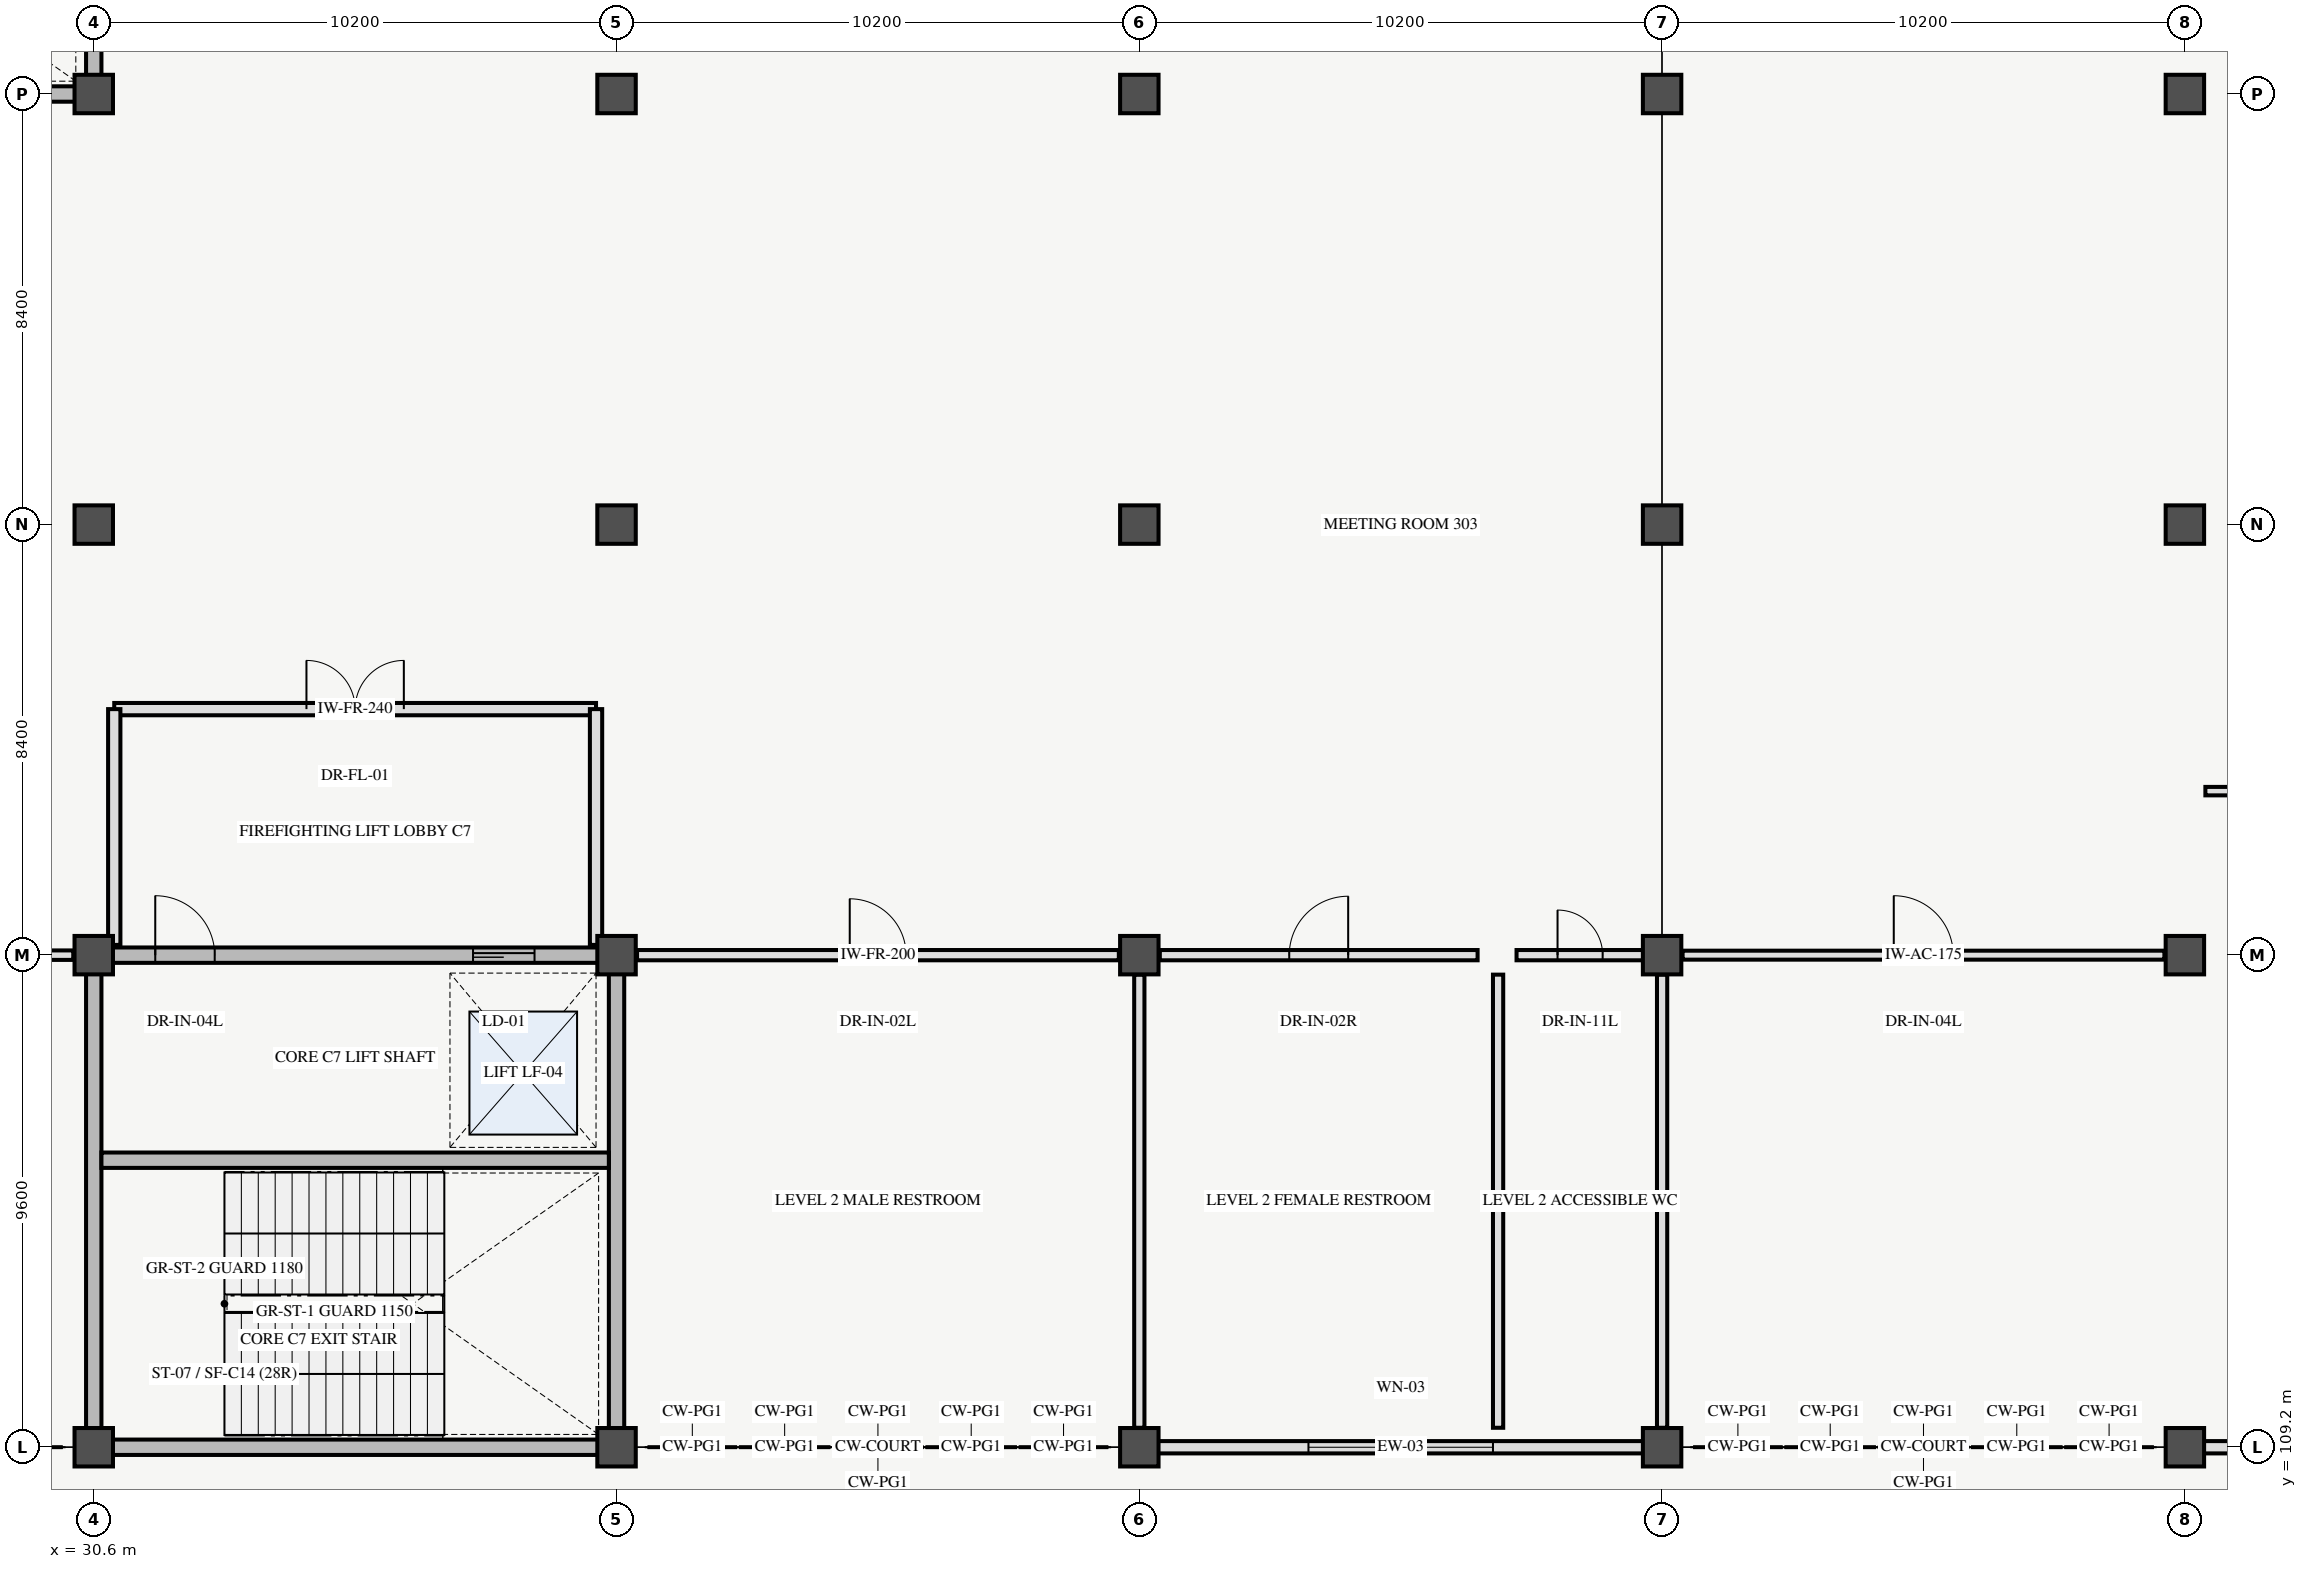
"""IFC4 building model, lengths in metres.
Left out: names, types, materials, properties, quantities, classifications, styles, units other than length and angle.
Written with IfcOpenShell. Run it as: python <this file> out.ifc"""

import sys

from ifc_helpers import new_model, si_unit, direction, frame, frame_2d, origin, origin_2d, place, context, subcontext, project, spatial, rectangle, extrude, element, fill, save


model = new_model("IFC4")
c1 = context("Model", 3, precision=1e-05, world=origin(), true_north=direction((0.0, 1.0)))
c2 = subcontext(c1, "Body", "Model", "MODEL_VIEW")
j1 = project(units=[si_unit("LENGTHUNIT", "METRE"), si_unit("PLANEANGLEUNIT", "RADIAN")], contexts=[c1])
p1 = place(None, origin())
s1 = spatial("IfcSite", under=j1, at=p1, CompositionType="ELEMENT")
p2 = place(p1, origin())
s2 = spatial("IfcBuilding", under=s1, at=p2, CompositionType="ELEMENT")
p3 = place(p2, frame((0.0, 0.0, 10.8)))
s3 = spatial("IfcBuildingStorey", under=s2, at=p3, CompositionType="ELEMENT", Elevation=10.8)
for number, where, z_axis, x_axis in (
    (1, (30.6, 109.2, 0.0), (0.0, 0.0, 1.0), (1.0, 0.0, 0.0)),
    (2, (30.6, 118.8, 0.0), (0.0, 0.0, 1.0), (1.0, 0.0, 0.0)),
    (3, (30.6, 127.2, 0.0), (0.0, 0.0, 1.0), (1.0, 0.0, 0.0)),
    (4, (30.6, 135.6, 0.0), (0.0, 0.0, 1.0), (1.0, 0.0, 0.0)),
    (5, (40.8, 109.2, 0.0), (0.0, 0.0, 1.0), (1.0, 0.0, 0.0)),
    (6, (40.8, 118.8, 0.0), (0.0, 0.0, 1.0), (1.0, 0.0, 0.0)),
    (7, (40.8, 127.2, 0.0), (0.0, 0.0, 1.0), (1.0, 0.0, 0.0)),
    (8, (40.8, 135.6, 0.0), (0.0, 0.0, 1.0), (1.0, 0.0, 0.0)),
    (9, (51.0, 109.2, 0.0), (0.0, 0.0, 1.0), (1.0, 0.0, 0.0)),
    (10, (51.0, 118.8, 0.0), (0.0, 0.0, 1.0), (1.0, 0.0, 0.0)),
    (11, (51.0, 127.2, 0.0), (0.0, 0.0, 1.0), (1.0, 0.0, 0.0)),
    (12, (51.0, 135.6, 0.0), (0.0, 0.0, 1.0), (1.0, 0.0, 0.0)),
    (13, (61.2, 109.2, 0.0), (0.0, 0.0, 1.0), (1.0, 0.0, 0.0)),
    (14, (61.2, 118.8, 0.0), (0.0, 0.0, 1.0), (1.0, 0.0, 0.0)),
    (15, (61.2, 127.2, 0.0), (0.0, 0.0, 1.0), (1.0, 0.0, 0.0)),
    (16, (61.2, 135.6, 0.0), (0.0, 0.0, 1.0), (1.0, 0.0, 0.0)),
    (17, (71.4, 109.2, 0.0), (0.0, 0.0, 1.0), (1.0, 0.0, 0.0)),
    (18, (71.4, 118.8, 0.0), (0.0, 0.0, 1.0), (1.0, 0.0, 0.0)),
    (19, (71.4, 127.2, 0.0), (0.0, 0.0, 1.0), (1.0, 0.0, 0.0)),
    (20, (71.4, 135.6, 0.0), (0.0, 0.0, 1.0), (1.0, 0.0, 0.0)),
):
    element("IfcColumn", number, at=place(p3, frame(where, z_axis=z_axis, x_axis=x_axis)), inside=s3, PredefinedType="COLUMN", context=c2, shape_type="SweptSolid", body=[
        extrude(rectangle(XDim=0.75, YDim=0.75, at=origin_2d()), origin(), (0.0, 0.0, 1.0), 4.2),
    ])
p4 = place(p3, frame((30.6, 109.2, 0.0), z_axis=(0.0, 0.0, 1.0), x_axis=(1.0, 0.0, 0.0)))
e21 = element("IfcWall", 21, at=p4, inside=s3, PredefinedType="SHEAR", context=c2, shape_type="SweptSolid", body=[
    extrude(rectangle(XDim=10.2, YDim=0.3, at=frame_2d((5.1, 0.0))), origin(), (0.0, 0.0, 1.0), 4.2),
])
p5 = place(p3, frame((30.6, 118.8, 0.0), z_axis=(0.0, 0.0, 1.0), x_axis=(1.0, 0.0, 0.0)))
e22 = element("IfcWall", 22, at=p5, inside=s3, PredefinedType="SHEAR", context=c2, shape_type="SweptSolid", body=[
    extrude(rectangle(XDim=10.2, YDim=0.3, at=frame_2d((5.1, 0.0))), origin(), (0.0, 0.0, 1.0), 4.2),
])
p6 = place(p5, frame((1.2, 0.0, 0.0)))
e23 = element("IfcOpeningElement", 23, at=p6, cuts=e22, PredefinedType="OPENING", context=c2, shape_type="SweptSolid", body=[
    extrude(rectangle(XDim=1.16, YDim=2.2, at=frame_2d((0.58, 1.1))), frame((0.0, 0.16, 0.0), z_axis=(0.0, -1.0, 0.0), x_axis=(1.0, 0.0, 0.0)), (0.0, 0.0, 1.0), 0.32),
])
p7 = place(p5, frame((7.4, 0.0, 0.0)))
e24 = element("IfcOpeningElement", 24, at=p7, cuts=e22, PredefinedType="OPENING", context=c2, shape_type="SweptSolid", body=[
    extrude(rectangle(XDim=1.2, YDim=2.25, at=frame_2d((0.6, 1.125))), frame((0.0, 0.16, 0.0), z_axis=(0.0, -1.0, 0.0), x_axis=(1.0, 0.0, 0.0)), (0.0, 0.0, 1.0), 0.32),
])
for number, where, z_axis, x_axis in (
    (25, (30.6, 109.2, 0.0), (0.0, 0.0, 1.0), (0.0, 1.0, 0.0)),
    (26, (40.8, 109.2, 0.0), (0.0, 0.0, 1.0), (0.0, 1.0, 0.0)),
):
    element("IfcWall", number, at=place(p3, frame(where, z_axis=z_axis, x_axis=x_axis)), inside=s3, PredefinedType="SHEAR", context=c2, shape_type="SweptSolid", body=[
        extrude(rectangle(XDim=9.6, YDim=0.3, at=frame_2d((4.8, 0.0))), origin(), (0.0, 0.0, 1.0), 4.2),
    ])
p8 = place(p3, frame((51.24, 109.2, 0.0), z_axis=(0.0, 0.0, 1.0), x_axis=(1.0, 0.0, 0.0)))
e27 = element("IfcWall", 27, at=p8, inside=s3, PredefinedType="STANDARD", context=c2, shape_type="SweptSolid", body=[
    extrude(rectangle(XDim=9.72, YDim=0.24, at=frame_2d((4.86, 0.0))), origin(), (0.0, 0.0, 1.0), 3.06),
])
p9 = place(p8, frame((3.06, 0.0, 0.9)))
e28 = element("IfcOpeningElement", 28, at=p9, cuts=e27, PredefinedType="OPENING", context=c2, shape_type="SweptSolid", body=[
    extrude(rectangle(XDim=3.6, YDim=2.1, at=frame_2d((1.8, 1.05))), frame((0.0, 0.13, 0.0), z_axis=(0.0, -1.0, 0.0), x_axis=(1.0, 0.0, 0.0)), (0.0, 0.0, 1.0), 0.26),
])
p10 = place(p3, frame((71.64, 109.2, 0.0), z_axis=(0.0, 0.0, 1.0), x_axis=(1.0, 0.0, 0.0)))
e29 = element("IfcWall", 29, at=p10, inside=s3, PredefinedType="STANDARD", context=c2, shape_type="SweptSolid", body=[
    extrude(rectangle(XDim=9.72, YDim=0.24, at=frame_2d((4.86, 0.0))), origin(), (0.0, 0.0, 1.0), 3.06),
])
p11 = place(p10, frame((3.06, 0.0, 0.9)))
e30 = element("IfcOpeningElement", 30, at=p11, cuts=e29, PredefinedType="OPENING", context=c2, shape_type="SweptSolid", body=[
    extrude(rectangle(XDim=3.6, YDim=2.1, at=frame_2d((1.8, 1.05))), frame((0.0, 0.13, 0.0), z_axis=(0.0, -1.0, 0.0), x_axis=(1.0, 0.0, 0.0)), (0.0, 0.0, 1.0), 0.26),
])
p12 = place(p3, frame((30.75, 114.8, 0.0), z_axis=(0.0, 0.0, 1.0), x_axis=(1.0, 0.0, 0.0)))
e31 = element("IfcWall", 31, at=p12, inside=s3, PredefinedType="SHEAR", context=c2, shape_type="SweptSolid", body=[
    extrude(rectangle(XDim=9.9, YDim=0.3, at=frame_2d((4.95, 0.0))), origin(), (0.0, 0.0, 1.0), 4.2),
])
p13 = place(p3, frame((20.4, 135.6, 0.0), z_axis=(0.0, 0.0, 1.0), x_axis=(1.0, 0.0, 0.0)))
e32 = element("IfcWall", 32, at=p13, inside=s3, PredefinedType="SHEAR", context=c2, shape_type="SweptSolid", body=[
    extrude(rectangle(XDim=10.2, YDim=0.3, at=frame_2d((5.1, 0.0))), origin(), (0.0, 0.0, 1.0), 4.2),
])
p14 = place(p13, frame((0.92, 0.0, 0.0)))
e33 = element("IfcOpeningElement", 33, at=p14, cuts=e32, PredefinedType="OPENING", context=c2, shape_type="SweptSolid", body=[
    extrude(rectangle(XDim=1.16, YDim=2.2, at=frame_2d((0.58, 1.1))), frame((0.0, 0.16, 0.0), z_axis=(0.0, -1.0, 0.0), x_axis=(1.0, 0.0, 0.0)), (0.0, 0.0, 1.0), 0.32),
])
p15 = place(p3, frame((30.6, 135.6, 0.0), z_axis=(0.0, 0.0, 1.0), x_axis=(0.0, 1.0, 0.0)))
e34 = element("IfcWall", 34, at=p15, inside=s3, PredefinedType="SHEAR", context=c2, shape_type="SweptSolid", body=[
    extrude(rectangle(XDim=8.4, YDim=0.3, at=frame_2d((4.2, 0.0))), origin(), (0.0, 0.0, 1.0), 4.2),
])
p16 = place(p3, frame((31.0, 123.6, 0.0), z_axis=(0.0, 0.0, 1.0), x_axis=(1.0, 0.0, 0.0)))
e35 = element("IfcWall", 35, at=p16, inside=s3, PredefinedType="PARTITIONING", context=c2, shape_type="SweptSolid", body=[
    extrude(rectangle(XDim=9.4, YDim=0.24, at=frame_2d((4.7, 0.0))), origin(), (0.0, 0.0, 1.0), 3.06),
])
p17 = place(p16, frame((3.75, 0.0, 0.0)))
e36 = element("IfcOpeningElement", 36, at=p17, cuts=e35, PredefinedType="OPENING", context=c2, shape_type="SweptSolid", body=[
    extrude(rectangle(XDim=1.9, YDim=2.25, at=frame_2d((0.95, 1.125))), frame((0.0, 0.13, 0.0), z_axis=(0.0, -1.0, 0.0), x_axis=(1.0, 0.0, 0.0)), (0.0, 0.0, 1.0), 0.26),
])
for number, where, z_axis, x_axis in (
    (37, (40.4, 119.0, 0.0), (0.0, 0.0, 1.0), (0.0, 1.0, 0.0)),
    (38, (31.0, 119.0, 0.0), (0.0, 0.0, 1.0), (0.0, 1.0, 0.0)),
):
    element("IfcWall", number, at=place(p3, frame(where, z_axis=z_axis, x_axis=x_axis)), inside=s3, PredefinedType="PARTITIONING", context=c2, shape_type="SweptSolid", body=[
        extrude(rectangle(XDim=4.6, YDim=0.24, at=frame_2d((2.3, 0.0))), origin(), (0.0, 0.0, 1.0), 3.06),
    ])
p18 = place(p3, frame((41.2, 118.8, 0.0), z_axis=(0.0, 0.0, 1.0), x_axis=(1.0, 0.0, 0.0)))
e39 = element("IfcWall", 39, at=p18, inside=s3, PredefinedType="PARTITIONING", context=c2, shape_type="SweptSolid", body=[
    extrude(rectangle(XDim=9.4, YDim=0.2, at=frame_2d((4.7, 0.0))), origin(), (0.0, 0.0, 1.0), 3.06),
])
p19 = place(p18, frame((4.15, 0.0, 0.0)))
e40 = element("IfcOpeningElement", 40, at=p19, cuts=e39, PredefinedType="OPENING", context=c2, shape_type="SweptSolid", body=[
    extrude(rectangle(XDim=1.1, YDim=2.2, at=frame_2d((0.55, 1.1))), frame((0.0, 0.11, 0.0), z_axis=(0.0, -1.0, 0.0), x_axis=(1.0, 0.0, 0.0)), (0.0, 0.0, 1.0), 0.22),
])
p20 = place(p3, frame((51.4, 118.8, 0.0), z_axis=(0.0, 0.0, 1.0), x_axis=(1.0, 0.0, 0.0)))
e41 = element("IfcWall", 41, at=p20, inside=s3, PredefinedType="PARTITIONING", context=c2, shape_type="SweptSolid", body=[
    extrude(rectangle(XDim=6.2, YDim=0.2, at=frame_2d((3.1, 0.0))), origin(), (0.0, 0.0, 1.0), 3.06),
])
p21 = place(p20, frame((2.525, 0.0, 0.0)))
e42 = element("IfcOpeningElement", 42, at=p21, cuts=e41, PredefinedType="OPENING", context=c2, shape_type="SweptSolid", body=[
    extrude(rectangle(XDim=1.15, YDim=2.2, at=frame_2d((0.575, 1.1))), frame((0.0, 0.11, 0.0), z_axis=(0.0, -1.0, 0.0), x_axis=(1.0, 0.0, 0.0)), (0.0, 0.0, 1.0), 0.22),
])
p22 = place(p3, frame((20.8, 118.8, 0.0), z_axis=(0.0, 0.0, 1.0), x_axis=(1.0, 0.0, 0.0)))
e43 = element("IfcWall", 43, at=p22, inside=s3, PredefinedType="PARTITIONING", context=c2, shape_type="SweptSolid", body=[
    extrude(rectangle(XDim=9.4, YDim=0.185, at=frame_2d((4.7, 0.0))), origin(), (0.0, 0.0, 1.0), 3.06),
])
p23 = place(p22, frame((4.22, 0.0, 0.0)))
e44 = element("IfcOpeningElement", 44, at=p23, cuts=e43, PredefinedType="OPENING", context=c2, shape_type="SweptSolid", body=[
    extrude(rectangle(XDim=0.96, YDim=2.1, at=frame_2d((0.48, 1.05))), frame((0.0, 0.103, 0.0), z_axis=(0.0, -1.0, 0.0), x_axis=(1.0, 0.0, 0.0)), (0.0, 0.0, 1.0), 0.205),
])
p24 = place(p3, frame((61.6, 118.8, 0.0), z_axis=(0.0, 0.0, 1.0), x_axis=(1.0, 0.0, 0.0)))
e45 = element("IfcWall", 45, at=p24, inside=s3, PredefinedType="PARTITIONING", context=c2, shape_type="SweptSolid", body=[
    extrude(rectangle(XDim=9.4, YDim=0.175, at=frame_2d((4.7, 0.0))), origin(), (0.0, 0.0, 1.0), 3.06),
])
p25 = place(p24, frame((4.12, 0.0, 0.0)))
e46 = element("IfcOpeningElement", 46, at=p25, cuts=e45, PredefinedType="OPENING", context=c2, shape_type="SweptSolid", body=[
    extrude(rectangle(XDim=1.16, YDim=2.2, at=frame_2d((0.58, 1.1))), frame((0.0, 0.097, 0.0), z_axis=(0.0, -1.0, 0.0), x_axis=(1.0, 0.0, 0.0)), (0.0, 0.0, 1.0), 0.195),
])
p26 = place(p3, frame((71.8, 122.0, 0.0), z_axis=(0.0, 0.0, 1.0), x_axis=(1.0, 0.0, 0.0)))
e47 = element("IfcWall", 47, at=p26, inside=s3, PredefinedType="PARTITIONING", context=c2, shape_type="SweptSolid", body=[
    extrude(rectangle(XDim=9.4, YDim=0.165, at=frame_2d((4.7, 0.0))), origin(), (0.0, 0.0, 1.0), 3.06),
])
p27 = place(p26, frame((4.08, 0.0, 0.0)))
e48 = element("IfcOpeningElement", 48, at=p27, cuts=e47, PredefinedType="OPENING", context=c2, shape_type="SweptSolid", body=[
    extrude(rectangle(XDim=1.24, YDim=2.2, at=frame_2d((0.62, 1.1))), frame((0.0, 0.093, 0.0), z_axis=(0.0, -1.0, 0.0), x_axis=(1.0, 0.0, 0.0)), (0.0, 0.0, 1.0), 0.185),
])
p28 = place(p3, frame((58.36, 118.8, 0.0), z_axis=(0.0, 0.0, 1.0), x_axis=(1.0, 0.0, 0.0)))
e49 = element("IfcWall", 49, at=p28, inside=s3, PredefinedType="PARTITIONING", context=c2, shape_type="SweptSolid", body=[
    extrude(rectangle(XDim=2.48, YDim=0.2, at=frame_2d((1.24, 0.0))), origin(), (0.0, 0.0, 1.0), 3.06),
])
p29 = place(p28, frame((0.8, 0.0, 0.0)))
e50 = element("IfcOpeningElement", 50, at=p29, cuts=e49, PredefinedType="OPENING", context=c2, shape_type="SweptSolid", body=[
    extrude(rectangle(XDim=0.88, YDim=2.08, at=frame_2d((0.44, 1.04))), frame((0.0, 0.11, 0.0), z_axis=(0.0, -1.0, 0.0), x_axis=(1.0, 0.0, 0.0)), (0.0, 0.0, 1.0), 0.22),
])
for number, where, z_axis, x_axis in (
    (51, (51.0, 109.58, 0.0), (0.0, 0.0, 1.0), (0.0, 1.0, 0.0)),
    (52, (58.0, 109.58, 0.0), (0.0, 0.0, 1.0), (0.0, 1.0, 0.0)),
    (53, (61.2, 109.58, 0.0), (0.0, 0.0, 1.0), (0.0, 1.0, 0.0)),
):
    element("IfcWall", number, at=place(p3, frame(where, z_axis=z_axis, x_axis=x_axis)), inside=s3, PredefinedType="PARTITIONING", context=c2, shape_type="SweptSolid", body=[
        extrude(rectangle(XDim=8.84, YDim=0.2, at=frame_2d((4.42, 0.0))), origin(), (0.0, 0.0, 1.0), 3.06),
    ])
p30 = place(p9, origin())
e54 = element("IfcWindow", 54, at=p30, inside=s3, PartitioningType="TRIPLE_PANEL_VERTICAL", PredefinedType="WINDOW", context=c2, shape_type="SweptSolid", body=[
    extrude(rectangle(XDim=3.6, YDim=2.1, at=frame_2d((1.8, 1.05))), frame((0.0, 0.03, 0.0), z_axis=(0.0, -1.0, 0.0), x_axis=(1.0, 0.0, 0.0)), (0.0, 0.0, 1.0), 0.06),
])
fill(e28, e54)
p31 = place(p6, origin())
e55 = element("IfcDoor", 55, at=p31, inside=s3, OperationType="SINGLE_SWING_LEFT", PredefinedType="DOOR", context=c2, shape_type="SweptSolid", body=[
    extrude(rectangle(XDim=1.16, YDim=2.2, at=frame_2d((0.58, 1.1))), frame((0.0, 0.025, 0.0), z_axis=(0.0, -1.0, 0.0), x_axis=(1.0, 0.0, 0.0)), (0.0, 0.0, 1.0), 0.05),
])
fill(e23, e55)
p32 = place(p7, origin())
e56 = element("IfcDoor", 56, at=p32, inside=s3, OperationType="SLIDING_TO_LEFT", PredefinedType="DOOR", context=c2, shape_type="SweptSolid", body=[
    extrude(rectangle(XDim=1.2, YDim=2.25, at=frame_2d((0.6, 1.125))), frame((0.0, 0.025, 0.0), z_axis=(0.0, -1.0, 0.0), x_axis=(1.0, 0.0, 0.0)), (0.0, 0.0, 1.0), 0.05),
])
fill(e24, e56)
p33 = place(p17, origin())
e57 = element("IfcDoor", 57, at=p33, inside=s3, OperationType="DOUBLE_DOOR_SINGLE_SWING", PredefinedType="DOOR", context=c2, shape_type="SweptSolid", body=[
    extrude(rectangle(XDim=1.9, YDim=2.25, at=frame_2d((0.95, 1.125))), frame((0.0, 0.025, 0.0), z_axis=(0.0, -1.0, 0.0), x_axis=(1.0, 0.0, 0.0)), (0.0, 0.0, 1.0), 0.05),
])
fill(e36, e57)
p34 = place(p19, origin())
e58 = element("IfcDoor", 58, at=p34, inside=s3, OperationType="SINGLE_SWING_LEFT", PredefinedType="DOOR", context=c2, shape_type="SweptSolid", body=[
    extrude(rectangle(XDim=1.1, YDim=2.2, at=frame_2d((0.55, 1.1))), frame((0.0, 0.025, 0.0), z_axis=(0.0, -1.0, 0.0), x_axis=(1.0, 0.0, 0.0)), (0.0, 0.0, 1.0), 0.05),
])
fill(e40, e58)
p35 = place(p21, origin())
e59 = element("IfcDoor", 59, at=p35, inside=s3, OperationType="SINGLE_SWING_RIGHT", PredefinedType="DOOR", context=c2, shape_type="SweptSolid", body=[
    extrude(rectangle(XDim=1.15, YDim=2.2, at=frame_2d((0.575, 1.1))), frame((0.0, 0.025, 0.0), z_axis=(0.0, -1.0, 0.0), x_axis=(1.0, 0.0, 0.0)), (0.0, 0.0, 1.0), 0.05),
])
fill(e42, e59)
p36 = place(p25, origin())
e60 = element("IfcDoor", 60, at=p36, inside=s3, OperationType="SINGLE_SWING_LEFT", PredefinedType="DOOR", context=c2, shape_type="SweptSolid", body=[
    extrude(rectangle(XDim=1.16, YDim=2.2, at=frame_2d((0.58, 1.1))), frame((0.0, 0.025, 0.0), z_axis=(0.0, -1.0, 0.0), x_axis=(1.0, 0.0, 0.0)), (0.0, 0.0, 1.0), 0.05),
])
fill(e46, e60)
p37 = place(p29, origin())
e61 = element("IfcDoor", 61, at=p37, inside=s3, OperationType="SINGLE_SWING_LEFT", PredefinedType="DOOR", context=c2, shape_type="SweptSolid", body=[
    extrude(rectangle(XDim=0.88, YDim=2.08, at=frame_2d((0.44, 1.04))), frame((0.0, 0.025, 0.0), z_axis=(0.0, -1.0, 0.0), x_axis=(1.0, 0.0, 0.0)), (0.0, 0.0, 1.0), 0.05),
])
fill(e50, e61)
save(model, sys.argv[1])
